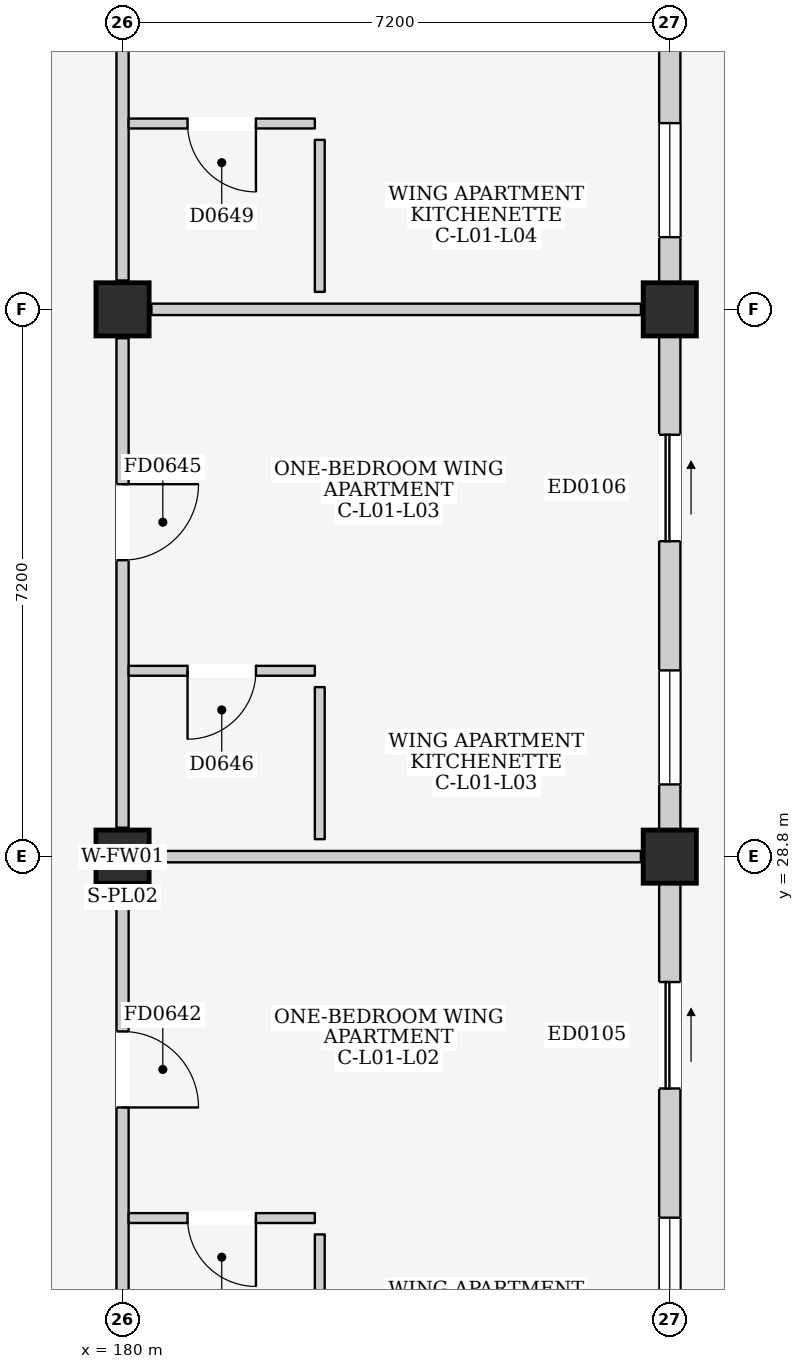
"""IFC4 building model, lengths in metres.
Left out: names, types, materials, properties, quantities, classifications, styles, units other than length and angle.
Written with IfcOpenShell. Run it as: python <this file> out.ifc"""

import sys

from ifc_helpers import new_model, si_unit, direction, frame, frame_2d, origin, origin_2d, place, context, subcontext, project, spatial, rectangle, extrude, element, fill, save


model = new_model("IFC4")
c1 = context("Model", 3, precision=1e-05, world=origin(), true_north=direction((0.0, 1.0)))
c2 = subcontext(c1, "Body", "Model", "MODEL_VIEW")
j1 = project(units=[si_unit("LENGTHUNIT", "METRE"), si_unit("PLANEANGLEUNIT", "RADIAN")], contexts=[c1])
p1 = place(None, origin())
s1 = spatial("IfcSite", under=j1, at=p1, CompositionType="ELEMENT")
p2 = place(p1, origin())
s2 = spatial("IfcBuilding", under=s1, at=p2, CompositionType="ELEMENT")
p3 = place(p2, frame((0.0, 0.0, 4.5)))
s3 = spatial("IfcBuildingStorey", under=s2, at=p3, CompositionType="ELEMENT", Elevation=4.5)
for number, where, z_axis, x_axis in (
    (1, (180.0, 28.8, 0.0), (0.0, 0.0, 1.0), (1.0, 0.0, 0.0)),
    (2, (180.0, 36.0, 0.0), (0.0, 0.0, 1.0), (1.0, 0.0, 0.0)),
    (3, (187.2, 28.8, 0.0), (0.0, 0.0, 1.0), (1.0, 0.0, 0.0)),
    (4, (187.2, 36.0, 0.0), (0.0, 0.0, 1.0), (1.0, 0.0, 0.0)),
):
    element("IfcColumn", number, at=place(p3, frame(where, z_axis=z_axis, x_axis=x_axis)), inside=s3, PredefinedType="COLUMN", context=c2, shape_type="SweptSolid", body=[
        extrude(rectangle(XDim=0.7, YDim=0.7, at=origin_2d()), origin(), (0.0, 0.0, 1.0), 4.5),
    ])
p4 = place(p3, frame((187.2, 21.95, 0.0), z_axis=(0.0, 0.0, 1.0), x_axis=(0.0, 1.0, 0.0)))
e5 = element("IfcWall", 5, at=p4, inside=s3, PredefinedType="ELEMENTEDWALL", context=c2, shape_type="SweptSolid", body=[
    extrude(rectangle(XDim=6.5, YDim=0.28, at=frame_2d((3.25, 0.0))), origin(), (0.0, 0.0, 1.0), 3.715),
])
p5 = place(p4, frame((3.8, 0.0, 0.0)))
e6 = element("IfcOpeningElement", 6, at=p5, cuts=e5, PredefinedType="OPENING", context=c2, shape_type="SweptSolid", body=[
    extrude(rectangle(XDim=1.4, YDim=2.1, at=frame_2d((0.7, 1.05))), frame((0.0, 0.155, 0.0), z_axis=(0.0, -1.0, 0.0), x_axis=(1.0, 0.0, 0.0)), (0.0, 0.0, 1.0), 0.31),
])
p6 = place(p4, frame((0.6, 0.0, 0.95)))
e7 = element("IfcOpeningElement", 7, at=p6, cuts=e5, PredefinedType="OPENING", context=c2, shape_type="SweptSolid", body=[
    extrude(rectangle(XDim=1.5, YDim=1.5, at=frame_2d((0.75, 0.75))), frame((0.0, 0.155, 0.0), z_axis=(0.0, -1.0, 0.0), x_axis=(1.0, 0.0, 0.0)), (0.0, 0.0, 1.0), 0.31),
])
p7 = place(p3, frame((187.2, 29.15, 0.0), z_axis=(0.0, 0.0, 1.0), x_axis=(0.0, 1.0, 0.0)))
e8 = element("IfcWall", 8, at=p7, inside=s3, PredefinedType="ELEMENTEDWALL", context=c2, shape_type="SweptSolid", body=[
    extrude(rectangle(XDim=6.5, YDim=0.28, at=frame_2d((3.25, 0.0))), origin(), (0.0, 0.0, 1.0), 3.715),
])
p8 = place(p7, frame((3.8, 0.0, 0.0)))
e9 = element("IfcOpeningElement", 9, at=p8, cuts=e8, PredefinedType="OPENING", context=c2, shape_type="SweptSolid", body=[
    extrude(rectangle(XDim=1.4, YDim=2.1, at=frame_2d((0.7, 1.05))), frame((0.0, 0.155, 0.0), z_axis=(0.0, -1.0, 0.0), x_axis=(1.0, 0.0, 0.0)), (0.0, 0.0, 1.0), 0.31),
])
p9 = place(p7, frame((0.6, 0.0, 0.95)))
e10 = element("IfcOpeningElement", 10, at=p9, cuts=e8, PredefinedType="OPENING", context=c2, shape_type="SweptSolid", body=[
    extrude(rectangle(XDim=1.5, YDim=1.5, at=frame_2d((0.75, 0.75))), frame((0.0, 0.155, 0.0), z_axis=(0.0, -1.0, 0.0), x_axis=(1.0, 0.0, 0.0)), (0.0, 0.0, 1.0), 0.31),
])
p10 = place(p3, frame((187.2, 36.35, 0.0), z_axis=(0.0, 0.0, 1.0), x_axis=(0.0, 1.0, 0.0)))
e11 = element("IfcWall", 11, at=p10, inside=s3, PredefinedType="ELEMENTEDWALL", context=c2, shape_type="SweptSolid", body=[
    extrude(rectangle(XDim=6.5, YDim=0.28, at=frame_2d((3.25, 0.0))), origin(), (0.0, 0.0, 1.0), 3.715),
])
p11 = place(p10, frame((3.8, 0.0, 0.0)))
e12 = element("IfcOpeningElement", 12, at=p11, cuts=e11, PredefinedType="OPENING", context=c2, shape_type="SweptSolid", body=[
    extrude(rectangle(XDim=1.4, YDim=2.1, at=frame_2d((0.7, 1.05))), frame((0.0, 0.155, 0.0), z_axis=(0.0, -1.0, 0.0), x_axis=(1.0, 0.0, 0.0)), (0.0, 0.0, 1.0), 0.31),
])
p12 = place(p10, frame((0.6, 0.0, 0.95)))
e13 = element("IfcOpeningElement", 13, at=p12, cuts=e11, PredefinedType="OPENING", context=c2, shape_type="SweptSolid", body=[
    extrude(rectangle(XDim=1.5, YDim=1.5, at=frame_2d((0.75, 0.75))), frame((0.0, 0.155, 0.0), z_axis=(0.0, -1.0, 0.0), x_axis=(1.0, 0.0, 0.0)), (0.0, 0.0, 1.0), 0.31),
])
p13 = place(p3, frame((180.0, 21.98, 0.0), z_axis=(0.0, 0.0, 1.0), x_axis=(0.0, 1.0, 0.0)))
e14 = element("IfcWall", 14, at=p13, inside=s3, PredefinedType="PARTITIONING", context=c2, shape_type="SweptSolid", body=[
    extrude(rectangle(XDim=6.44, YDim=0.16, at=frame_2d((3.22, 0.0))), origin(), (0.0, 0.0, 1.0), 3.685),
])
p14 = place(p13, frame((3.52, 0.0, 0.0)))
e15 = element("IfcOpeningElement", 15, at=p14, cuts=e14, PredefinedType="OPENING", context=c2, shape_type="SweptSolid", body=[
    extrude(rectangle(XDim=1.0, YDim=2.15, at=frame_2d((0.5, 1.075))), frame((0.0, 0.095, 0.0), z_axis=(0.0, -1.0, 0.0), x_axis=(1.0, 0.0, 0.0)), (0.0, 0.0, 1.0), 0.19),
])
p15 = place(p3, frame((180.38, 28.8, 0.0), z_axis=(0.0, 0.0, 1.0), x_axis=(1.0, 0.0, 0.0)))
e16 = element("IfcWall", 16, at=p15, inside=s3, PredefinedType="PARTITIONING", context=c2, shape_type="SweptSolid", body=[
    extrude(rectangle(XDim=6.44, YDim=0.15, at=frame_2d((3.22, 0.0))), origin(), (0.0, 0.0, 1.0), 3.635),
])
p16 = place(p3, frame((180.08, 24.045, 0.0), z_axis=(0.0, 0.0, 1.0), x_axis=(1.0, 0.0, 0.0)))
e17 = element("IfcWall", 17, at=p16, inside=s3, PredefinedType="PARTITIONING", context=c2, shape_type="SweptSolid", body=[
    extrude(rectangle(XDim=2.45, YDim=0.13, at=frame_2d((1.225, 0.0))), origin(), (0.0, 0.0, 1.0), 4.25),
])
p17 = place(p16, frame((0.775, 0.0, 0.0)))
e18 = element("IfcOpeningElement", 18, at=p17, cuts=e17, PredefinedType="OPENING", context=c2, shape_type="SweptSolid", body=[
    extrude(rectangle(XDim=0.9, YDim=2.1, at=frame_2d((0.45, 1.05))), frame((0.0, 0.08, 0.0), z_axis=(0.0, -1.0, 0.0), x_axis=(1.0, 0.0, 0.0)), (0.0, 0.0, 1.0), 0.16),
])
p18 = place(p3, frame((182.595, 21.83, 0.0), z_axis=(0.0, 0.0, 1.0), x_axis=(0.0, 1.0, 0.0)))
e19 = element("IfcWall", 19, at=p18, inside=s3, PredefinedType="PARTITIONING", context=c2, shape_type="SweptSolid", body=[
    extrude(rectangle(XDim=2.0, YDim=0.13, at=frame_2d((1.0, 0.0))), origin(), (0.0, 0.0, 1.0), 4.25),
])
p19 = place(p3, frame((180.0, 29.18, 0.0), z_axis=(0.0, 0.0, 1.0), x_axis=(0.0, 1.0, 0.0)))
e20 = element("IfcWall", 20, at=p19, inside=s3, PredefinedType="PARTITIONING", context=c2, shape_type="SweptSolid", body=[
    extrude(rectangle(XDim=6.44, YDim=0.16, at=frame_2d((3.22, 0.0))), origin(), (0.0, 0.0, 1.0), 3.685),
])
p20 = place(p19, frame((3.52, 0.0, 0.0)))
e21 = element("IfcOpeningElement", 21, at=p20, cuts=e20, PredefinedType="OPENING", context=c2, shape_type="SweptSolid", body=[
    extrude(rectangle(XDim=1.0, YDim=2.15, at=frame_2d((0.5, 1.075))), frame((0.0, 0.095, 0.0), z_axis=(0.0, -1.0, 0.0), x_axis=(1.0, 0.0, 0.0)), (0.0, 0.0, 1.0), 0.19),
])
p21 = place(p3, frame((180.38, 36.0, 0.0), z_axis=(0.0, 0.0, 1.0), x_axis=(1.0, 0.0, 0.0)))
e22 = element("IfcWall", 22, at=p21, inside=s3, PredefinedType="PARTITIONING", context=c2, shape_type="SweptSolid", body=[
    extrude(rectangle(XDim=6.44, YDim=0.15, at=frame_2d((3.22, 0.0))), origin(), (0.0, 0.0, 1.0), 3.635),
])
p22 = place(p3, frame((180.08, 31.245, 0.0), z_axis=(0.0, 0.0, 1.0), x_axis=(1.0, 0.0, 0.0)))
e23 = element("IfcWall", 23, at=p22, inside=s3, PredefinedType="PARTITIONING", context=c2, shape_type="SweptSolid", body=[
    extrude(rectangle(XDim=2.45, YDim=0.13, at=frame_2d((1.225, 0.0))), origin(), (0.0, 0.0, 1.0), 4.25),
])
p23 = place(p22, frame((0.775, 0.0, 0.0)))
e24 = element("IfcOpeningElement", 24, at=p23, cuts=e23, PredefinedType="OPENING", context=c2, shape_type="SweptSolid", body=[
    extrude(rectangle(XDim=0.9, YDim=2.1, at=frame_2d((0.45, 1.05))), frame((0.0, 0.08, 0.0), z_axis=(0.0, -1.0, 0.0), x_axis=(1.0, 0.0, 0.0)), (0.0, 0.0, 1.0), 0.16),
])
p24 = place(p3, frame((182.595, 29.03, 0.0), z_axis=(0.0, 0.0, 1.0), x_axis=(0.0, 1.0, 0.0)))
e25 = element("IfcWall", 25, at=p24, inside=s3, PredefinedType="PARTITIONING", context=c2, shape_type="SweptSolid", body=[
    extrude(rectangle(XDim=2.0, YDim=0.13, at=frame_2d((1.0, 0.0))), origin(), (0.0, 0.0, 1.0), 4.25),
])
p25 = place(p3, frame((180.0, 36.38, 0.0), z_axis=(0.0, 0.0, 1.0), x_axis=(0.0, 1.0, 0.0)))
e26 = element("IfcWall", 26, at=p25, inside=s3, PredefinedType="PARTITIONING", context=c2, shape_type="SweptSolid", body=[
    extrude(rectangle(XDim=6.44, YDim=0.16, at=frame_2d((3.22, 0.0))), origin(), (0.0, 0.0, 1.0), 3.685),
])
p26 = place(p25, frame((3.52, 0.0, 0.0)))
e27 = element("IfcOpeningElement", 27, at=p26, cuts=e26, PredefinedType="OPENING", context=c2, shape_type="SweptSolid", body=[
    extrude(rectangle(XDim=1.0, YDim=2.15, at=frame_2d((0.5, 1.075))), frame((0.0, 0.095, 0.0), z_axis=(0.0, -1.0, 0.0), x_axis=(1.0, 0.0, 0.0)), (0.0, 0.0, 1.0), 0.19),
])
p27 = place(p3, frame((180.08, 38.445, 0.0), z_axis=(0.0, 0.0, 1.0), x_axis=(1.0, 0.0, 0.0)))
e28 = element("IfcWall", 28, at=p27, inside=s3, PredefinedType="PARTITIONING", context=c2, shape_type="SweptSolid", body=[
    extrude(rectangle(XDim=2.45, YDim=0.13, at=frame_2d((1.225, 0.0))), origin(), (0.0, 0.0, 1.0), 4.25),
])
p28 = place(p27, frame((0.775, 0.0, 0.0)))
e29 = element("IfcOpeningElement", 29, at=p28, cuts=e28, PredefinedType="OPENING", context=c2, shape_type="SweptSolid", body=[
    extrude(rectangle(XDim=0.9, YDim=2.1, at=frame_2d((0.45, 1.05))), frame((0.0, 0.08, 0.0), z_axis=(0.0, -1.0, 0.0), x_axis=(1.0, 0.0, 0.0)), (0.0, 0.0, 1.0), 0.16),
])
p29 = place(p3, frame((182.595, 36.23, 0.0), z_axis=(0.0, 0.0, 1.0), x_axis=(0.0, 1.0, 0.0)))
e30 = element("IfcWall", 30, at=p29, inside=s3, PredefinedType="PARTITIONING", context=c2, shape_type="SweptSolid", body=[
    extrude(rectangle(XDim=2.0, YDim=0.13, at=frame_2d((1.0, 0.0))), origin(), (0.0, 0.0, 1.0), 4.25),
])
p30 = place(p5, frame((1.4, 0.0, 0.0), z_axis=(0.0, 0.0, 1.0), x_axis=(-1.0, 0.0, 0.0)))
e31 = element("IfcDoor", 31, at=p30, inside=s3, OperationType="SLIDING_TO_RIGHT", PredefinedType="DOOR", context=c2, shape_type="SweptSolid", body=[
    extrude(rectangle(XDim=1.4, YDim=2.1, at=frame_2d((0.7, 1.05))), frame((0.0, 0.025, 0.0), z_axis=(0.0, -1.0, 0.0), x_axis=(1.0, 0.0, 0.0)), (0.0, 0.0, 1.0), 0.05),
])
fill(e6, e31)
p31 = place(p6, origin())
e32 = element("IfcWindow", 32, at=p31, inside=s3, PartitioningType="DOUBLE_PANEL_VERTICAL", PredefinedType="WINDOW", context=c2, shape_type="SweptSolid", body=[
    extrude(rectangle(XDim=1.5, YDim=1.5, at=frame_2d((0.75, 0.75))), frame((0.0, 0.03, 0.0), z_axis=(0.0, -1.0, 0.0), x_axis=(1.0, 0.0, 0.0)), (0.0, 0.0, 1.0), 0.06),
])
fill(e7, e32)
p32 = place(p8, frame((1.4, 0.0, 0.0), z_axis=(0.0, 0.0, 1.0), x_axis=(-1.0, 0.0, 0.0)))
e33 = element("IfcDoor", 33, at=p32, inside=s3, OperationType="SLIDING_TO_RIGHT", PredefinedType="DOOR", context=c2, shape_type="SweptSolid", body=[
    extrude(rectangle(XDim=1.4, YDim=2.1, at=frame_2d((0.7, 1.05))), frame((0.0, 0.025, 0.0), z_axis=(0.0, -1.0, 0.0), x_axis=(1.0, 0.0, 0.0)), (0.0, 0.0, 1.0), 0.05),
])
fill(e9, e33)
p33 = place(p9, origin())
e34 = element("IfcWindow", 34, at=p33, inside=s3, PartitioningType="DOUBLE_PANEL_VERTICAL", PredefinedType="WINDOW", context=c2, shape_type="SweptSolid", body=[
    extrude(rectangle(XDim=1.5, YDim=1.5, at=frame_2d((0.75, 0.75))), frame((0.0, 0.03, 0.0), z_axis=(0.0, -1.0, 0.0), x_axis=(1.0, 0.0, 0.0)), (0.0, 0.0, 1.0), 0.06),
])
fill(e10, e34)
p34 = place(p12, origin())
e35 = element("IfcWindow", 35, at=p34, inside=s3, PartitioningType="DOUBLE_PANEL_VERTICAL", PredefinedType="WINDOW", context=c2, shape_type="SweptSolid", body=[
    extrude(rectangle(XDim=1.5, YDim=1.5, at=frame_2d((0.75, 0.75))), frame((0.0, 0.03, 0.0), z_axis=(0.0, -1.0, 0.0), x_axis=(1.0, 0.0, 0.0)), (0.0, 0.0, 1.0), 0.06),
])
fill(e13, e35)
p35 = place(p14, frame((1.0, 0.0, 0.0), z_axis=(0.0, 0.0, 1.0), x_axis=(-1.0, 0.0, 0.0)))
e36 = element("IfcDoor", 36, at=p35, inside=s3, OperationType="SINGLE_SWING_RIGHT", PredefinedType="DOOR", context=c2, shape_type="SweptSolid", body=[
    extrude(rectangle(XDim=1.0, YDim=2.15, at=frame_2d((0.5, 1.075))), frame((0.0, 0.025, 0.0), z_axis=(0.0, -1.0, 0.0), x_axis=(1.0, 0.0, 0.0)), (0.0, 0.0, 1.0), 0.05),
])
fill(e15, e36)
p36 = place(p17, frame((0.9, 0.0, 0.0), z_axis=(0.0, 0.0, 1.0), x_axis=(-1.0, 0.0, 0.0)))
e37 = element("IfcDoor", 37, at=p36, inside=s3, OperationType="SINGLE_SWING_LEFT", PredefinedType="DOOR", context=c2, shape_type="SweptSolid", body=[
    extrude(rectangle(XDim=0.9, YDim=2.1, at=frame_2d((0.45, 1.05))), frame((0.0, 0.025, 0.0), z_axis=(0.0, -1.0, 0.0), x_axis=(1.0, 0.0, 0.0)), (0.0, 0.0, 1.0), 0.05),
])
fill(e18, e37)
p37 = place(p20, frame((1.0, 0.0, 0.0), z_axis=(0.0, 0.0, 1.0), x_axis=(-1.0, 0.0, 0.0)))
e38 = element("IfcDoor", 38, at=p37, inside=s3, OperationType="SINGLE_SWING_LEFT", PredefinedType="DOOR", context=c2, shape_type="SweptSolid", body=[
    extrude(rectangle(XDim=1.0, YDim=2.15, at=frame_2d((0.5, 1.075))), frame((0.0, 0.025, 0.0), z_axis=(0.0, -1.0, 0.0), x_axis=(1.0, 0.0, 0.0)), (0.0, 0.0, 1.0), 0.05),
])
fill(e21, e38)
p38 = place(p23, frame((0.9, 0.0, 0.0), z_axis=(0.0, 0.0, 1.0), x_axis=(-1.0, 0.0, 0.0)))
e39 = element("IfcDoor", 39, at=p38, inside=s3, OperationType="SINGLE_SWING_RIGHT", PredefinedType="DOOR", context=c2, shape_type="SweptSolid", body=[
    extrude(rectangle(XDim=0.9, YDim=2.1, at=frame_2d((0.45, 1.05))), frame((0.0, 0.025, 0.0), z_axis=(0.0, -1.0, 0.0), x_axis=(1.0, 0.0, 0.0)), (0.0, 0.0, 1.0), 0.05),
])
fill(e24, e39)
p39 = place(p28, frame((0.9, 0.0, 0.0), z_axis=(0.0, 0.0, 1.0), x_axis=(-1.0, 0.0, 0.0)))
e40 = element("IfcDoor", 40, at=p39, inside=s3, OperationType="SINGLE_SWING_LEFT", PredefinedType="DOOR", context=c2, shape_type="SweptSolid", body=[
    extrude(rectangle(XDim=0.9, YDim=2.1, at=frame_2d((0.45, 1.05))), frame((0.0, 0.025, 0.0), z_axis=(0.0, -1.0, 0.0), x_axis=(1.0, 0.0, 0.0)), (0.0, 0.0, 1.0), 0.05),
])
fill(e29, e40)
save(model, sys.argv[1])
